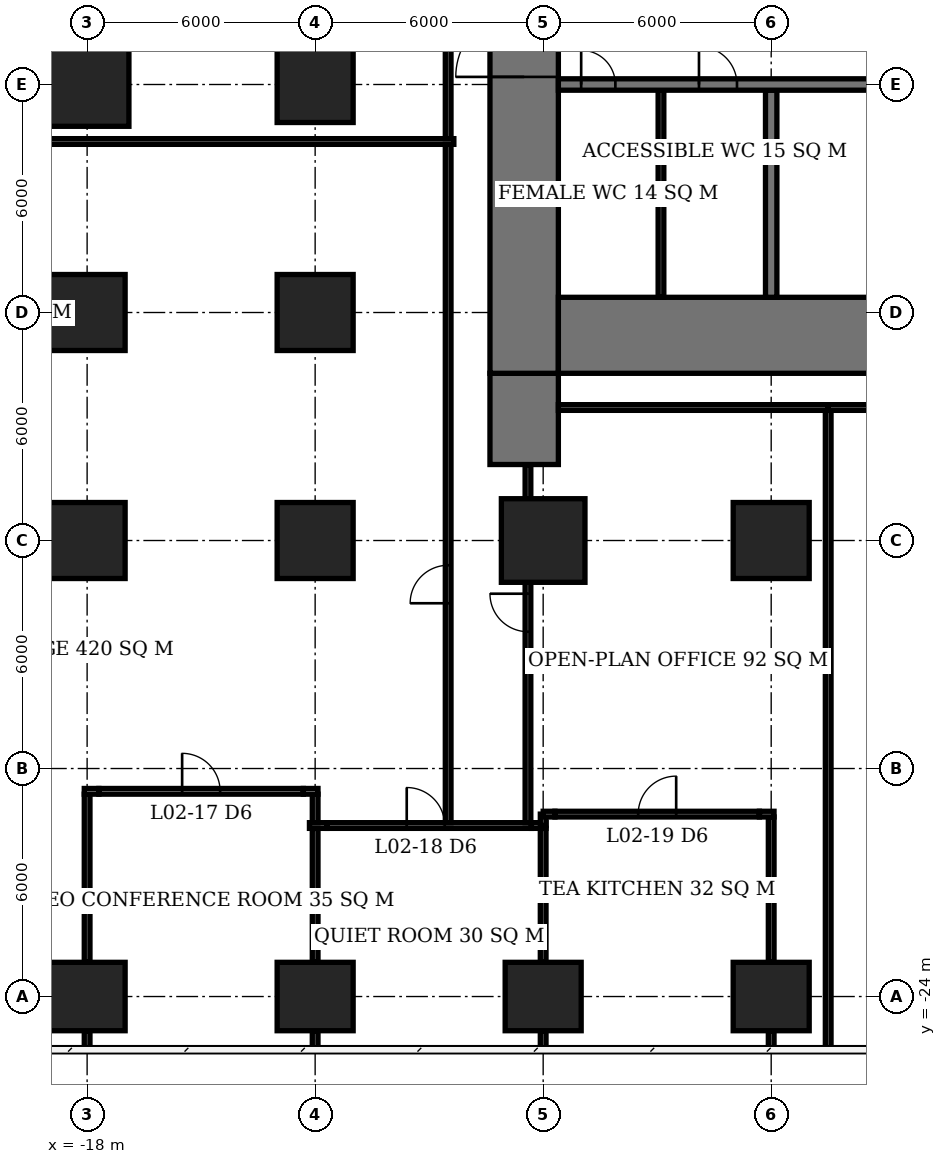
"""IFC4 building model, lengths in metres.
Left out: names, types, materials, properties, quantities, classifications, styles, units other than length and angle.
Written with IfcOpenShell. Run it as: python <this file> out.ifc"""

import sys

from ifc_helpers import new_model, si_unit, direction, frame, frame_2d, origin, origin_2d, place, context, subcontext, project, spatial, rectangle, extrude, element, fill, save


model = new_model("IFC4")
c1 = context("Model", 3, precision=1e-05, world=origin(), true_north=direction((0.0, 1.0)))
c2 = subcontext(c1, "Body", "Model", "MODEL_VIEW")
j1 = project(units=[si_unit("LENGTHUNIT", "METRE"), si_unit("PLANEANGLEUNIT", "RADIAN")], contexts=[c1])
p1 = place(None, origin())
s1 = spatial("IfcSite", under=j1, at=p1, CompositionType="ELEMENT")
p2 = place(p1, origin())
s2 = spatial("IfcBuilding", under=s1, at=p2, CompositionType="ELEMENT")
p3 = place(p2, frame((0.0, 0.0, 11.0)))
s3 = spatial("IfcBuildingStorey", under=s2, at=p3, CompositionType="ELEMENT", Elevation=11.0)
p4 = place(p3, frame((-18.0, -24.0, 0.0), z_axis=(0.0, 0.0, 1.0), x_axis=(1.0, 0.0, 0.0)))
e1 = element("IfcColumn", 1, at=p4, inside=s3, PredefinedType="COLUMN", context=c2, shape_type="SweptSolid", body=[
    extrude(rectangle(XDim=2.0, YDim=1.8, at=origin_2d()), origin(), (0.0, 0.0, 1.0), 7.2),
])
for number, where, z_axis, x_axis in (
    (2, (-18.0, -12.0, 0.0), (0.0, 0.0, 1.0), (1.0, 0.0, 0.0)),
    (3, (-18.0, -6.0, 0.0), (0.0, 0.0, 1.0), (1.0, 0.0, 0.0)),
):
    element("IfcColumn", number, at=place(p3, frame(where, z_axis=z_axis, x_axis=x_axis)), inside=s3, PredefinedType="COLUMN", context=c2, shape_type="SweptSolid", body=[
        extrude(rectangle(XDim=2.0, YDim=2.0, at=origin_2d()), origin(), (0.0, 0.0, 1.0), 7.2),
    ])
p5 = place(p3, frame((-18.0, 0.0, 0.0), z_axis=(0.0, 0.0, 1.0), x_axis=(1.0, 0.0, 0.0)))
e4 = element("IfcColumn", 4, at=p5, inside=s3, PredefinedType="COLUMN", context=c2, shape_type="SweptSolid", body=[
    extrude(rectangle(XDim=2.2, YDim=2.2, at=origin_2d()), origin(), (0.0, 0.0, 1.0), 7.2),
])
p6 = place(p3, frame((-12.0, -24.0, 0.0), z_axis=(0.0, 0.0, 1.0), x_axis=(1.0, 0.0, 0.0)))
e5 = element("IfcColumn", 5, at=p6, inside=s3, PredefinedType="COLUMN", context=c2, shape_type="SweptSolid", body=[
    extrude(rectangle(XDim=2.0, YDim=1.8, at=origin_2d()), origin(), (0.0, 0.0, 1.0), 7.2),
])
for number, where, z_axis, x_axis in (
    (6, (-12.0, -12.0, 0.0), (0.0, 0.0, 1.0), (1.0, 0.0, 0.0)),
    (7, (-12.0, -6.0, 0.0), (0.0, 0.0, 1.0), (1.0, 0.0, 0.0)),
    (8, (-12.0, 0.0, 0.0), (0.0, 0.0, 1.0), (1.0, 0.0, 0.0)),
):
    element("IfcColumn", number, at=place(p3, frame(where, z_axis=z_axis, x_axis=x_axis)), inside=s3, PredefinedType="COLUMN", context=c2, shape_type="SweptSolid", body=[
        extrude(rectangle(XDim=2.0, YDim=2.0, at=origin_2d()), origin(), (0.0, 0.0, 1.0), 7.2),
    ])
p7 = place(p3, frame((-6.0, -24.0, 0.0), z_axis=(0.0, 0.0, 1.0), x_axis=(1.0, 0.0, 0.0)))
e9 = element("IfcColumn", 9, at=p7, inside=s3, PredefinedType="COLUMN", context=c2, shape_type="SweptSolid", body=[
    extrude(rectangle(XDim=2.0, YDim=1.8, at=origin_2d()), origin(), (0.0, 0.0, 1.0), 7.2),
])
p8 = place(p3, frame((-6.0, -12.0, 0.0), z_axis=(0.0, 0.0, 1.0), x_axis=(1.0, 0.0, 0.0)))
e10 = element("IfcColumn", 10, at=p8, inside=s3, PredefinedType="COLUMN", context=c2, shape_type="SweptSolid", body=[
    extrude(rectangle(XDim=2.2, YDim=2.2, at=origin_2d()), origin(), (0.0, 0.0, 1.0), 7.2),
])
p9 = place(p3, frame((0.0, -24.0, 0.0), z_axis=(0.0, 0.0, 1.0), x_axis=(1.0, 0.0, 0.0)))
e11 = element("IfcColumn", 11, at=p9, inside=s3, PredefinedType="COLUMN", context=c2, shape_type="SweptSolid", body=[
    extrude(rectangle(XDim=2.0, YDim=1.8, at=origin_2d()), origin(), (0.0, 0.0, 1.0), 7.2),
])
p10 = place(p3, frame((0.0, -12.0, 0.0), z_axis=(0.0, 0.0, 1.0), x_axis=(1.0, 0.0, 0.0)))
e12 = element("IfcColumn", 12, at=p10, inside=s3, PredefinedType="COLUMN", context=c2, shape_type="SweptSolid", body=[
    extrude(rectangle(XDim=2.0, YDim=2.0, at=origin_2d()), origin(), (0.0, 0.0, 1.0), 7.2),
])
p11 = place(p3, frame((-5.6, -6.6, 0.0), z_axis=(0.0, 0.0, 1.0), x_axis=(1.0, 0.0, 0.0)))
e13 = element("IfcWall", 13, at=p11, inside=s3, PredefinedType="SHEAR", context=c2, shape_type="SweptSolid", body=[
    extrude(rectangle(XDim=23.2, YDim=2.0, at=frame_2d((11.6, 0.0))), origin(), (0.0, 0.0, 1.0), 7.2),
])
p12 = place(p3, frame((-6.5, -7.6, 0.0), z_axis=(0.0, 0.0, 1.0), x_axis=(0.0, 1.0, 0.0)))
e14 = element("IfcWall", 14, at=p12, inside=s3, PredefinedType="SHEAR", context=c2, shape_type="SweptSolid", body=[
    extrude(rectangle(XDim=21.2, YDim=1.8, at=frame_2d((10.6, 0.0))), origin(), (0.0, 0.0, 1.0), 7.2),
])
p13 = place(p12, frame((7.8, 0.0, 0.0)))
e15 = element("IfcOpeningElement", 15, at=p13, cuts=e14, PredefinedType="OPENING", context=c2, shape_type="SweptSolid", body=[
    extrude(rectangle(XDim=1.8, YDim=2.4, at=frame_2d((0.9, 1.2))), frame((0.0, 0.91, 0.0), z_axis=(0.0, -1.0, 0.0), x_axis=(1.0, 0.0, 0.0)), (0.0, 0.0, 1.0), 1.82),
])
p14 = place(p3, frame((-6.5, -10.0, 0.0), z_axis=(0.0, 0.0, 1.0), x_axis=(0.0, 1.0, 0.0)))
e16 = element("IfcWall", 16, at=p14, inside=s3, PredefinedType="SHEAR", context=c2, shape_type="SweptSolid", body=[
    extrude(rectangle(XDim=2.4, YDim=1.8, at=frame_2d((1.2, 0.0))), origin(), (0.0, 0.0, 1.0), 7.2),
])
p15 = place(p3, frame((-5.6, 0.0, 0.0), z_axis=(0.0, 0.0, 1.0), x_axis=(1.0, 0.0, 0.0)))
e17 = element("IfcWall", 17, at=p15, inside=s3, PredefinedType="SHEAR", context=c2, shape_type="SweptSolid", body=[
    extrude(rectangle(XDim=17.75, YDim=0.3, at=frame_2d((8.875, 0.0))), origin(), (0.0, 0.0, 1.0), 7.2),
])
p16 = place(p15, frame((0.6, 0.0, 0.0)))
e18 = element("IfcOpeningElement", 18, at=p16, cuts=e17, PredefinedType="OPENING", context=c2, shape_type="SweptSolid", body=[
    extrude(rectangle(XDim=0.9, YDim=2.1, at=frame_2d((0.45, 1.05))), frame((0.0, 0.16, 0.0), z_axis=(0.0, -1.0, 0.0), x_axis=(1.0, 0.0, 0.0)), (0.0, 0.0, 1.0), 0.32),
])
p17 = place(p15, frame((3.7, 0.0, 0.0)))
e19 = element("IfcOpeningElement", 19, at=p17, cuts=e17, PredefinedType="OPENING", context=c2, shape_type="SweptSolid", body=[
    extrude(rectangle(XDim=1.0, YDim=2.1, at=frame_2d((0.5, 1.05))), frame((0.0, 0.16, 0.0), z_axis=(0.0, -1.0, 0.0), x_axis=(1.0, 0.0, 0.0)), (0.0, 0.0, 1.0), 0.32),
])
p18 = place(p3, frame((0.0, -5.6, 0.0), z_axis=(0.0, 0.0, 1.0), x_axis=(0.0, 1.0, 0.0)))
e20 = element("IfcWall", 20, at=p18, inside=s3, PredefinedType="SHEAR", context=c2, shape_type="SweptSolid", body=[
    extrude(rectangle(XDim=5.45, YDim=0.3, at=frame_2d((2.725, 0.0))), origin(), (0.0, 0.0, 1.0), 7.2),
])
p19 = place(p3, frame((-2.9, -5.6, 0.0), z_axis=(0.0, 0.0, 1.0), x_axis=(0.0, 1.0, 0.0)))
e21 = element("IfcWall", 21, at=p19, inside=s3, PredefinedType="PLUMBINGWALL", context=c2, shape_type="SweptSolid", body=[
    extrude(rectangle(XDim=5.45, YDim=0.15, at=frame_2d((2.725, 0.0))), origin(), (0.0, 0.0, 1.0), 6.95),
])
p20 = place(p3, frame((-12.15, -19.5, 0.0), z_axis=(0.0, 0.0, 1.0), x_axis=(1.0, 0.0, 0.0)))
e22 = element("IfcWall", 22, at=p20, inside=s3, PredefinedType="PARTITIONING", context=c2, shape_type="SweptSolid", body=[
    extrude(rectangle(XDim=0.46, YDim=0.15, at=frame_2d((0.23, 0.0))), origin(), (0.0, 0.0, 1.0), 6.35),
])
p21 = place(p3, frame((-11.69, -19.5, 0.0), z_axis=(0.0, 0.0, 1.0), x_axis=(1.0, 0.0, 0.0)))
e23 = element("IfcWall", 23, at=p21, inside=s3, PredefinedType="PARTITIONING", context=c2, shape_type="SweptSolid", body=[
    extrude(rectangle(XDim=5.38, YDim=0.15, at=frame_2d((2.69, 0.0))), origin(), (0.0, 0.0, 1.0), 6.95),
])
p22 = place(p21, frame((2.1, 0.0, 0.0)))
e24 = element("IfcOpeningElement", 24, at=p22, cuts=e23, PredefinedType="OPENING", context=c2, shape_type="SweptSolid", body=[
    extrude(rectangle(XDim=1.0, YDim=2.1, at=frame_2d((0.5, 1.05))), frame((0.0, 0.085, 0.0), z_axis=(0.0, -1.0, 0.0), x_axis=(1.0, 0.0, 0.0)), (0.0, 0.0, 1.0), 0.17),
])
p23 = place(p3, frame((-6.31, -19.5, 0.0), z_axis=(0.0, 0.0, 1.0), x_axis=(1.0, 0.0, 0.0)))
e25 = element("IfcWall", 25, at=p23, inside=s3, PredefinedType="PARTITIONING", context=c2, shape_type="SweptSolid", body=[
    extrude(rectangle(XDim=0.385, YDim=0.15, at=frame_2d((0.192, 0.0))), origin(), (0.0, 0.0, 1.0), 6.35),
])
p24 = place(p3, frame((-6.0, -19.2, 0.0), z_axis=(0.0, 0.0, 1.0), x_axis=(1.0, 0.0, 0.0)))
e26 = element("IfcWall", 26, at=p24, inside=s3, PredefinedType="PARTITIONING", context=c2, shape_type="SweptSolid", body=[
    extrude(rectangle(XDim=0.31, YDim=0.15, at=frame_2d((0.155, 0.0))), origin(), (0.0, 0.0, 1.0), 6.35),
])
p25 = place(p3, frame((-5.69, -19.2, 0.0), z_axis=(0.0, 0.0, 1.0), x_axis=(1.0, 0.0, 0.0)))
e27 = element("IfcWall", 27, at=p25, inside=s3, PredefinedType="PARTITIONING", context=c2, shape_type="SweptSolid", body=[
    extrude(rectangle(XDim=5.38, YDim=0.15, at=frame_2d((2.69, 0.0))), origin(), (0.0, 0.0, 1.0), 6.95),
])
p26 = place(p25, frame((2.19, 0.0, 0.0)))
e28 = element("IfcOpeningElement", 28, at=p26, cuts=e27, PredefinedType="OPENING", context=c2, shape_type="SweptSolid", body=[
    extrude(rectangle(XDim=1.0, YDim=2.1, at=frame_2d((0.5, 1.05))), frame((0.0, 0.085, 0.0), z_axis=(0.0, -1.0, 0.0), x_axis=(1.0, 0.0, 0.0)), (0.0, 0.0, 1.0), 0.17),
])
for number, where, z_axis, x_axis in (
    (29, (-0.31, -19.2, 0.0), (0.0, 0.0, 1.0), (1.0, 0.0, 0.0)),
    (30, (-18.075, -18.6, 0.0), (0.0, 0.0, 1.0), (1.0, 0.0, 0.0)),
):
    element("IfcWall", number, at=place(p3, frame(where, z_axis=z_axis, x_axis=x_axis)), inside=s3, PredefinedType="PARTITIONING", context=c2, shape_type="SweptSolid", body=[
        extrude(rectangle(XDim=0.385, YDim=0.15, at=frame_2d((0.192, 0.0))), origin(), (0.0, 0.0, 1.0), 6.35),
    ])
p27 = place(p3, frame((-17.69, -18.6, 0.0), z_axis=(0.0, 0.0, 1.0), x_axis=(1.0, 0.0, 0.0)))
e31 = element("IfcWall", 31, at=p27, inside=s3, PredefinedType="PARTITIONING", context=c2, shape_type="SweptSolid", body=[
    extrude(rectangle(XDim=5.38, YDim=0.15, at=frame_2d((2.69, 0.0))), origin(), (0.0, 0.0, 1.0), 6.95),
])
p28 = place(p27, frame((2.19, 0.0, 0.0)))
e32 = element("IfcOpeningElement", 32, at=p28, cuts=e31, PredefinedType="OPENING", context=c2, shape_type="SweptSolid", body=[
    extrude(rectangle(XDim=1.0, YDim=2.1, at=frame_2d((0.5, 1.05))), frame((0.0, 0.085, 0.0), z_axis=(0.0, -1.0, 0.0), x_axis=(1.0, 0.0, 0.0)), (0.0, 0.0, 1.0), 0.17),
])
p29 = place(p3, frame((-12.31, -18.6, 0.0), z_axis=(0.0, 0.0, 1.0), x_axis=(1.0, 0.0, 0.0)))
e33 = element("IfcWall", 33, at=p29, inside=s3, PredefinedType="PARTITIONING", context=c2, shape_type="SweptSolid", body=[
    extrude(rectangle(XDim=0.385, YDim=0.15, at=frame_2d((0.192, 0.0))), origin(), (0.0, 0.0, 1.0), 6.35),
])
p30 = place(p3, frame((-18.0, -25.375, 0.0), z_axis=(0.0, 0.0, 1.0), x_axis=(0.0, 1.0, 0.0)))
e34 = element("IfcWall", 34, at=p30, inside=s3, PredefinedType="PARTITIONING", context=c2, shape_type="SweptSolid", body=[
    extrude(rectangle(XDim=0.475, YDim=0.15, at=frame_2d((0.238, 0.0))), origin(), (0.0, 0.0, 1.0), 6.95),
])
p31 = place(p3, frame((-18.0, -23.1, 0.0), z_axis=(0.0, 0.0, 1.0), x_axis=(0.0, 1.0, 0.0)))
e35 = element("IfcWall", 35, at=p31, inside=s3, PredefinedType="PARTITIONING", context=c2, shape_type="SweptSolid", body=[
    extrude(rectangle(XDim=4.425, YDim=0.15, at=frame_2d((2.212, 0.0))), origin(), (0.0, 0.0, 1.0), 6.35),
])
p32 = place(p3, frame((-12.0, -25.375, 0.0), z_axis=(0.0, 0.0, 1.0), x_axis=(0.0, 1.0, 0.0)))
e36 = element("IfcWall", 36, at=p32, inside=s3, PredefinedType="PARTITIONING", context=c2, shape_type="SweptSolid", body=[
    extrude(rectangle(XDim=0.475, YDim=0.15, at=frame_2d((0.238, 0.0))), origin(), (0.0, 0.0, 1.0), 6.95),
])
p33 = place(p3, frame((-12.0, -23.1, 0.0), z_axis=(0.0, 0.0, 1.0), x_axis=(0.0, 1.0, 0.0)))
e37 = element("IfcWall", 37, at=p33, inside=s3, PredefinedType="PARTITIONING", context=c2, shape_type="SweptSolid", body=[
    extrude(rectangle(XDim=3.525, YDim=0.15, at=frame_2d((1.763, 0.0))), origin(), (0.0, 0.0, 1.0), 6.35),
])
p34 = place(p3, frame((-12.0, -19.425, 0.0), z_axis=(0.0, 0.0, 1.0), x_axis=(0.0, 1.0, 0.0)))
e38 = element("IfcWall", 38, at=p34, inside=s3, PredefinedType="PARTITIONING", context=c2, shape_type="SweptSolid", body=[
    extrude(rectangle(XDim=0.75, YDim=0.15, at=frame_2d((0.375, 0.0))), origin(), (0.0, 0.0, 1.0), 6.35),
])
p35 = place(p3, frame((-6.0, -25.375, 0.0), z_axis=(0.0, 0.0, 1.0), x_axis=(0.0, 1.0, 0.0)))
e39 = element("IfcWall", 39, at=p35, inside=s3, PredefinedType="PARTITIONING", context=c2, shape_type="SweptSolid", body=[
    extrude(rectangle(XDim=0.475, YDim=0.15, at=frame_2d((0.238, 0.0))), origin(), (0.0, 0.0, 1.0), 6.95),
])
p36 = place(p3, frame((-6.0, -23.1, 0.0), z_axis=(0.0, 0.0, 1.0), x_axis=(0.0, 1.0, 0.0)))
e40 = element("IfcWall", 40, at=p36, inside=s3, PredefinedType="PARTITIONING", context=c2, shape_type="SweptSolid", body=[
    extrude(rectangle(XDim=3.525, YDim=0.15, at=frame_2d((1.763, 0.0))), origin(), (0.0, 0.0, 1.0), 6.35),
])
p37 = place(p3, frame((-6.0, -19.5, 0.0), z_axis=(0.0, 0.0, 1.0), x_axis=(0.0, 1.0, 0.0)))
e41 = element("IfcWall", 41, at=p37, inside=s3, PredefinedType="PARTITIONING", context=c2, shape_type="SweptSolid", body=[
    extrude(rectangle(XDim=0.3, YDim=0.15, at=frame_2d((0.15, 0.0))), origin(), (0.0, 0.0, 1.0), 6.35),
])
p38 = place(p3, frame((0.0, -25.35, 0.0), z_axis=(0.0, 0.0, 1.0), x_axis=(0.0, 1.0, 0.0)))
e42 = element("IfcWall", 42, at=p38, inside=s3, PredefinedType="PARTITIONING", context=c2, shape_type="SweptSolid", body=[
    extrude(rectangle(XDim=0.45, YDim=0.15, at=frame_2d((0.225, 0.0))), origin(), (0.0, 0.0, 1.0), 6.95),
])
p39 = place(p3, frame((0.0, -23.1, 0.0), z_axis=(0.0, 0.0, 1.0), x_axis=(0.0, 1.0, 0.0)))
e43 = element("IfcWall", 43, at=p39, inside=s3, PredefinedType="PARTITIONING", context=c2, shape_type="SweptSolid", body=[
    extrude(rectangle(XDim=3.825, YDim=0.15, at=frame_2d((1.913, 0.0))), origin(), (0.0, 0.0, 1.0), 6.35),
])
p40 = place(p3, frame((-19.075, -1.5, 0.0), z_axis=(0.0, 0.0, 1.0), x_axis=(1.0, 0.0, 0.0)))
e44 = element("IfcWall", 44, at=p40, inside=s3, PredefinedType="PARTITIONING", context=c2, shape_type="SweptSolid", body=[
    extrude(rectangle(XDim=10.725, YDim=0.15, at=frame_2d((5.362, 0.0))), origin(), (0.0, 0.0, 1.0), 6.95),
])
p41 = place(p3, frame((-8.5, -19.425, 0.0), z_axis=(0.0, 0.0, 1.0), x_axis=(0.0, 1.0, 0.0)))
e45 = element("IfcWall", 45, at=p41, inside=s3, PredefinedType="PARTITIONING", context=c2, shape_type="SweptSolid", body=[
    extrude(rectangle(XDim=17.85, YDim=0.15, at=frame_2d((8.925, 0.0))), origin(), (0.0, 0.0, 1.0), 6.95),
])
p42 = place(p41, frame((5.774, 0.0, 0.0)))
e46 = element("IfcOpeningElement", 46, at=p42, cuts=e45, PredefinedType="OPENING", context=c2, shape_type="SweptSolid", body=[
    extrude(rectangle(XDim=1.0, YDim=2.1, at=frame_2d((0.5, 1.05))), frame((0.0, 0.085, 0.0), z_axis=(0.0, -1.0, 0.0), x_axis=(1.0, 0.0, 0.0)), (0.0, 0.0, 1.0), 0.17),
])
p43 = place(p3, frame((-8.5, -1.425, 0.0), z_axis=(0.0, 0.0, 1.0), x_axis=(0.0, 1.0, 0.0)))
e47 = element("IfcWall", 47, at=p43, inside=s3, PredefinedType="PARTITIONING", context=c2, shape_type="SweptSolid", body=[
    extrude(rectangle(XDim=8.85, YDim=0.15, at=frame_2d((4.425, 0.0))), origin(), (0.0, 0.0, 1.0), 6.95),
])
p44 = place(p43, frame((2.575, 0.0, 0.0)))
e48 = element("IfcOpeningElement", 48, at=p44, cuts=e47, PredefinedType="OPENING", context=c2, shape_type="SweptSolid", body=[
    extrude(rectangle(XDim=1.0, YDim=2.1, at=frame_2d((0.5, 1.05))), frame((0.0, 0.085, 0.0), z_axis=(0.0, -1.0, 0.0), x_axis=(1.0, 0.0, 0.0)), (0.0, 0.0, 1.0), 0.17),
])
p45 = place(p3, frame((-6.4, -19.425, 0.0), z_axis=(0.0, 0.0, 1.0), x_axis=(0.0, 1.0, 0.0)))
e49 = element("IfcWall", 49, at=p45, inside=s3, PredefinedType="PARTITIONING", context=c2, shape_type="SweptSolid", body=[
    extrude(rectangle(XDim=6.325, YDim=0.15, at=frame_2d((3.163, 0.0))), origin(), (0.0, 0.0, 1.0), 6.95),
])
p46 = place(p45, frame((5.025, 0.0, 0.0)))
e50 = element("IfcOpeningElement", 50, at=p46, cuts=e49, PredefinedType="OPENING", context=c2, shape_type="SweptSolid", body=[
    extrude(rectangle(XDim=1.0, YDim=2.1, at=frame_2d((0.5, 1.05))), frame((0.0, 0.085, 0.0), z_axis=(0.0, -1.0, 0.0), x_axis=(1.0, 0.0, 0.0)), (0.0, 0.0, 1.0), 0.17),
])
p47 = place(p3, frame((-6.4, -10.9, 0.0), z_axis=(0.0, 0.0, 1.0), x_axis=(0.0, 1.0, 0.0)))
e51 = element("IfcWall", 51, at=p47, inside=s3, PredefinedType="PARTITIONING", context=c2, shape_type="SweptSolid", body=[
    extrude(rectangle(XDim=0.9, YDim=0.15, at=frame_2d((0.45, 0.0))), origin(), (0.0, 0.0, 1.0), 6.95),
])
p48 = place(p3, frame((-5.6, -8.5, 0.0), z_axis=(0.0, 0.0, 1.0), x_axis=(1.0, 0.0, 0.0)))
e52 = element("IfcWall", 52, at=p48, inside=s3, PredefinedType="PARTITIONING", context=c2, shape_type="SweptSolid", body=[
    extrude(rectangle(XDim=7.1, YDim=0.15, at=frame_2d((3.55, 0.0))), origin(), (0.0, 0.0, 1.0), 6.95),
])
p49 = place(p3, frame((1.5, -25.375, 0.0), z_axis=(0.0, 0.0, 1.0), x_axis=(0.0, 1.0, 0.0)))
e53 = element("IfcWall", 53, at=p49, inside=s3, PredefinedType="PARTITIONING", context=c2, shape_type="SweptSolid", body=[
    extrude(rectangle(XDim=16.8, YDim=0.15, at=frame_2d((8.4, 0.0))), origin(), (0.0, 0.0, 1.0), 6.95),
])
p50 = place(p3, frame((13.425, -8.5, 0.0), z_axis=(0.0, 0.0, 1.0), x_axis=(-1.0, 0.0, 0.0)))
e54 = element("IfcWall", 54, at=p50, inside=s3, PredefinedType="PARTITIONING", context=c2, shape_type="SweptSolid", body=[
    extrude(rectangle(XDim=11.925, YDim=0.15, at=frame_2d((5.962, 0.0))), origin(), (0.0, 0.0, 1.0), 6.95),
])
p51 = place(p50, frame((7.225, 0.0, 0.0)))
e55 = element("IfcOpeningElement", 55, at=p51, cuts=e54, PredefinedType="OPENING", context=c2, shape_type="SweptSolid", body=[
    extrude(rectangle(XDim=1.0, YDim=2.1, at=frame_2d((0.5, 1.05))), frame((0.0, 0.085, 0.0), z_axis=(0.0, -1.0, 0.0), x_axis=(1.0, 0.0, 0.0)), (0.0, 0.0, 1.0), 0.17),
])
p52 = place(p13, origin())
e56 = element("IfcDoor", 56, at=p52, inside=s3, OperationType="DOUBLE_DOOR_SINGLE_SWING", PredefinedType="DOOR", context=c2, shape_type="SweptSolid", body=[
    extrude(rectangle(XDim=1.8, YDim=2.4, at=frame_2d((0.9, 1.2))), frame((0.0, 0.025, 0.0), z_axis=(0.0, -1.0, 0.0), x_axis=(1.0, 0.0, 0.0)), (0.0, 0.0, 1.0), 0.05),
])
fill(e15, e56)
p53 = place(p16, origin())
e57 = element("IfcDoor", 57, at=p53, inside=s3, OperationType="SINGLE_SWING_LEFT", PredefinedType="DOOR", context=c2, shape_type="SweptSolid", body=[
    extrude(rectangle(XDim=0.9, YDim=2.1, at=frame_2d((0.45, 1.05))), frame((0.0, 0.025, 0.0), z_axis=(0.0, -1.0, 0.0), x_axis=(1.0, 0.0, 0.0)), (0.0, 0.0, 1.0), 0.05),
])
fill(e18, e57)
p54 = place(p17, origin())
e58 = element("IfcDoor", 58, at=p54, inside=s3, OperationType="SINGLE_SWING_LEFT", PredefinedType="DOOR", context=c2, shape_type="SweptSolid", body=[
    extrude(rectangle(XDim=1.0, YDim=2.1, at=frame_2d((0.5, 1.05))), frame((0.0, 0.025, 0.0), z_axis=(0.0, -1.0, 0.0), x_axis=(1.0, 0.0, 0.0)), (0.0, 0.0, 1.0), 0.05),
])
fill(e19, e58)
p55 = place(p28, origin())
e59 = element("IfcDoor", 59, at=p55, inside=s3, OperationType="SINGLE_SWING_LEFT", PredefinedType="DOOR", context=c2, shape_type="SweptSolid", body=[
    extrude(rectangle(XDim=1.0, YDim=2.1, at=frame_2d((0.5, 1.05))), frame((0.0, 0.025, 0.0), z_axis=(0.0, -1.0, 0.0), x_axis=(1.0, 0.0, 0.0)), (0.0, 0.0, 1.0), 0.05),
])
fill(e32, e59)
p56 = place(p22, origin())
e60 = element("IfcDoor", 60, at=p56, inside=s3, OperationType="SINGLE_SWING_LEFT", PredefinedType="DOOR", context=c2, shape_type="SweptSolid", body=[
    extrude(rectangle(XDim=1.0, YDim=2.1, at=frame_2d((0.5, 1.05))), frame((0.0, 0.025, 0.0), z_axis=(0.0, -1.0, 0.0), x_axis=(1.0, 0.0, 0.0)), (0.0, 0.0, 1.0), 0.05),
])
fill(e24, e60)
p57 = place(p26, origin())
e61 = element("IfcDoor", 61, at=p57, inside=s3, OperationType="SINGLE_SWING_RIGHT", PredefinedType="DOOR", context=c2, shape_type="SweptSolid", body=[
    extrude(rectangle(XDim=1.0, YDim=2.1, at=frame_2d((0.5, 1.05))), frame((0.0, 0.025, 0.0), z_axis=(0.0, -1.0, 0.0), x_axis=(1.0, 0.0, 0.0)), (0.0, 0.0, 1.0), 0.05),
])
fill(e28, e61)
p58 = place(p46, origin())
e62 = element("IfcDoor", 62, at=p58, inside=s3, OperationType="SINGLE_SWING_RIGHT", PredefinedType="DOOR", context=c2, shape_type="SweptSolid", body=[
    extrude(rectangle(XDim=1.0, YDim=2.1, at=frame_2d((0.5, 1.05))), frame((0.0, 0.025, 0.0), z_axis=(0.0, -1.0, 0.0), x_axis=(1.0, 0.0, 0.0)), (0.0, 0.0, 1.0), 0.05),
])
fill(e50, e62)
p59 = place(p42, origin())
e63 = element("IfcDoor", 63, at=p59, inside=s3, OperationType="SINGLE_SWING_LEFT", PredefinedType="DOOR", context=c2, shape_type="SweptSolid", body=[
    extrude(rectangle(XDim=1.0, YDim=2.1, at=frame_2d((0.5, 1.05))), frame((0.0, 0.025, 0.0), z_axis=(0.0, -1.0, 0.0), x_axis=(1.0, 0.0, 0.0)), (0.0, 0.0, 1.0), 0.05),
])
fill(e46, e63)
save(model, sys.argv[1])
